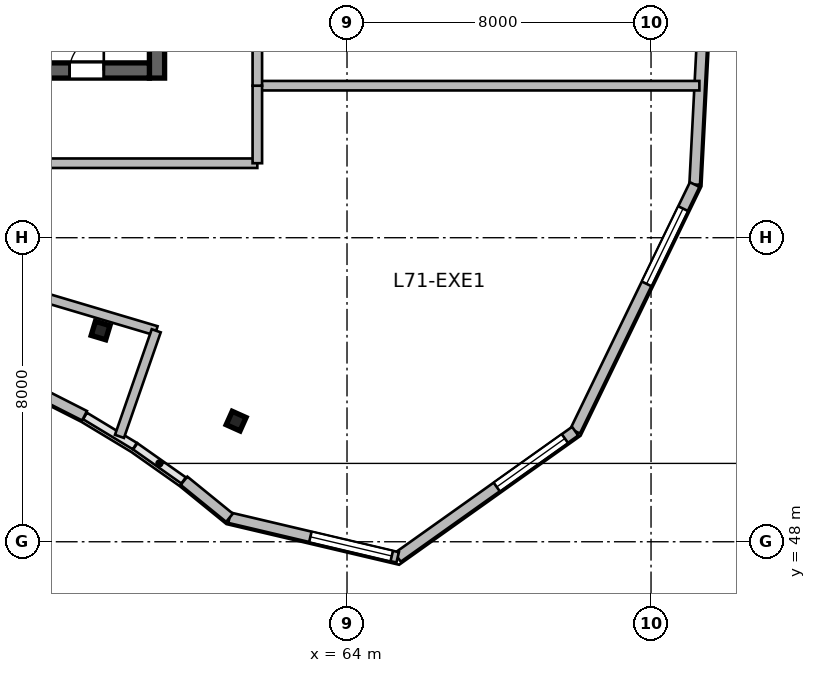
"""IFC4 building model, lengths in metres.
Left out: names, types, materials, properties, quantities, classifications, styles, units other than length and angle.
Written with IfcOpenShell. Run it as: python <this file> out.ifc"""

import sys

from ifc_helpers import new_model, si_unit, direction, frame, frame_2d, origin, origin_2d, place, context, subcontext, project, spatial, rectangle, i_section, extrude, source, transform, mapped, element, fill, save


model = new_model("IFC4")
c1 = context("Model", 3, precision=1e-05, world=origin(), true_north=direction((0.0, 1.0)))
c2 = subcontext(c1, "Body", "Model", "MODEL_VIEW")
j1 = project(units=[si_unit("LENGTHUNIT", "METRE"), si_unit("PLANEANGLEUNIT", "RADIAN")], contexts=[c1])
p1 = place(None, origin())
s1 = spatial("IfcSite", under=j1, at=p1, CompositionType="ELEMENT")
p2 = place(p1, origin())
s2 = spatial("IfcBuilding", under=s1, at=p2, CompositionType="ELEMENT")
p3 = place(p2, frame((0.0, 0.0, 291.3)))
s3 = spatial("IfcBuildingStorey", under=s2, at=p3, CompositionType="ELEMENT", Elevation=291.3)
m1 = source(origin(), c2, "Body", "SweptSolid", [
    extrude(rectangle(XDim=12.0, YDim=0.4, at=frame_2d((6.0, 0.0))), origin(), (0.0, 0.0, 1.0), 3.9),
])
p4 = place(p3, frame((59.0, 60.2, 0.0), z_axis=(0.0, 0.0, 1.0), x_axis=(0.0, 1.0, 0.0)))
e1 = element("IfcWall", 1, at=p4, inside=s3, PredefinedType="SHEAR", context=c2, shape_type="MappedRepresentation", body=[
    mapped(m1, transform((0.0, 0.0, 0.0), scale=1.0)),
])
m2 = source(origin(), c2, "Body", "SweptSolid", [
    extrude(rectangle(XDim=21.6, YDim=0.4, at=frame_2d((10.8, 0.0))), origin(), (0.0, 0.0, 1.0), 3.9),
])
p5 = place(p3, frame((37.2, 60.4, 0.0), z_axis=(0.0, 0.0, 1.0), x_axis=(1.0, 0.0, 0.0)))
e2 = element("IfcWall", 2, at=p5, inside=s3, PredefinedType="SHEAR", context=c2, shape_type="MappedRepresentation", body=[
    mapped(m2, transform((0.0, 0.0, 0.0), scale=1.0)),
])
p6 = place(p5, frame((1.1, 0.0, 0.0)))
e3 = element("IfcOpeningElement", 3, at=p6, cuts=e2, PredefinedType="OPENING", context=c2, shape_type="SweptSolid", body=[
    extrude(rectangle(XDim=1.15, YDim=2.15, at=frame_2d((0.575, 1.075))), frame((0.0, 0.21, 0.0), z_axis=(0.0, -1.0, 0.0), x_axis=(1.0, 0.0, 0.0)), (0.0, 0.0, 1.0), 0.42),
])
p7 = place(p5, frame((19.5, 0.0, 0.0)))
e4 = element("IfcOpeningElement", 4, at=p7, cuts=e2, PredefinedType="OPENING", context=c2, shape_type="SweptSolid", body=[
    extrude(rectangle(XDim=0.9, YDim=2.1, at=frame_2d((0.45, 1.05))), frame((0.0, 0.21, 0.0), z_axis=(0.0, -1.0, 0.0), x_axis=(1.0, 0.0, 0.0)), (0.0, 0.0, 1.0), 0.42),
])
p8 = place(p5, frame((12.02, 0.0, 0.0)))
e5 = element("IfcOpeningElement", 5, at=p8, cuts=e2, PredefinedType="OPENING", context=c2, shape_type="SweptSolid", body=[
    extrude(rectangle(XDim=1.6, YDim=2.15, at=frame_2d((0.8, 1.075))), frame((0.0, 0.21, 0.0), z_axis=(0.0, -1.0, 0.0), x_axis=(1.0, 0.0, 0.0)), (0.0, 0.0, 1.0), 0.42),
])
m3 = source(origin(), c2, "Body", "SweptSolid", [
    extrude(i_section(OverallWidth=0.399, OverallDepth=0.387, WebThickness=0.021, FlangeThickness=0.033, at=origin_2d()), origin(), (0.0, 0.0, 1.0), 3.9),
])
for number, where, z_axis, x_axis in (
    (6, (57.515, 53.558, 0.0), (0.0, 0.0, 1.0), (0.289, 0.957, 0.0)),
    (7, (61.082, 51.175, 0.0), (0.0, 0.0, 1.0), (0.409, 0.912, 0.0)),
):
    element("IfcColumn", number, at=place(p3, frame(where, z_axis=z_axis, x_axis=x_axis)), inside=s3, PredefinedType="COLUMN", context=c2, shape_type="MappedRepresentation", body=[
        mapped(m3, transform((0.0, 0.0, 0.0), scale=1.0)),
    ])
m4 = source(origin(), c2, "Body", "SweptSolid", [
    extrude(rectangle(XDim=7.151, YDim=0.28, at=frame_2d((3.576, 0.0))), origin(), (0.0, 0.0, 1.0), 3.64),
])
p9 = place(p3, frame((73.516, 64.54, 0.0), z_axis=(0.0, 0.0, 1.0), x_axis=(-0.051449614265, -0.998675591567, 0.0)))
e8 = element("IfcWall", 8, at=p9, inside=s3, PredefinedType="SOLIDWALL", context=c2, shape_type="MappedRepresentation", body=[
    mapped(m4, transform((0.0, 0.0, 0.0), scale=1.0)),
])
p10 = place(p9, frame((0.688, 0.0, 0.95)))
e9 = element("IfcOpeningElement", 9, at=p10, cuts=e8, PredefinedType="OPENING", context=c2, shape_type="SweptSolid", body=[
    extrude(rectangle(XDim=2.2, YDim=2.1, at=frame_2d((1.1, 1.05))), frame((0.0, 0.15, 0.0), z_axis=(0.0, -1.0, 0.0), x_axis=(1.0, 0.0, 0.0)), (0.0, 0.0, 1.0), 0.3),
])
m5 = source(origin(), c2, "Body", "SweptSolid", [
    extrude(rectangle(XDim=7.211, YDim=0.28, at=frame_2d((3.606, 0.0))), origin(), (0.0, 0.0, 1.0), 3.64),
])
p11 = place(p3, frame((73.148, 57.399, 0.0), z_axis=(0.0, 0.0, 1.0), x_axis=(-0.436088263006, -0.899903898685, 0.0)))
e10 = element("IfcWall", 10, at=p11, inside=s3, PredefinedType="SOLIDWALL", context=c2, shape_type="MappedRepresentation", body=[
    mapped(m5, transform((0.0, 0.0, 0.0), scale=1.0)),
])
p12 = place(p11, frame((0.703, 0.0, 0.95)))
e11 = element("IfcOpeningElement", 11, at=p12, cuts=e10, PredefinedType="OPENING", context=c2, shape_type="SweptSolid", body=[
    extrude(rectangle(XDim=2.2, YDim=2.1, at=frame_2d((1.1, 1.05))), frame((0.0, 0.15, 0.0), z_axis=(0.0, -1.0, 0.0), x_axis=(1.0, 0.0, 0.0)), (0.0, 0.0, 1.0), 0.3),
])
m6 = source(origin(), c2, "Body", "SweptSolid", [
    extrude(rectangle(XDim=5.731, YDim=0.28, at=frame_2d((2.865, 0.0))), origin(), (0.0, 0.0, 1.0), 3.64),
])
p13 = place(p3, frame((70.004, 50.909, 0.0), z_axis=(0.0, 0.0, 1.0), x_axis=(-0.815021045908, -0.579431354629, 0.0)))
e12 = element("IfcWall", 12, at=p13, inside=s3, PredefinedType="SOLIDWALL", context=c2, shape_type="MappedRepresentation", body=[
    mapped(m6, transform((0.0, 0.0, 0.0), scale=1.0)),
])
p14 = place(p13, frame((0.333, 0.0, 0.95)))
e13 = element("IfcOpeningElement", 13, at=p14, cuts=e12, PredefinedType="OPENING", context=c2, shape_type="SweptSolid", body=[
    extrude(rectangle(XDim=2.2, YDim=2.1, at=frame_2d((1.1, 1.05))), frame((0.0, 0.15, 0.0), z_axis=(0.0, -1.0, 0.0), x_axis=(1.0, 0.0, 0.0)), (0.0, 0.0, 1.0), 0.3),
])
m7 = source(origin(), c2, "Body", "SweptSolid", [
    extrude(rectangle(XDim=4.547, YDim=0.28, at=frame_2d((2.273, 0.0))), origin(), (0.0, 0.0, 1.0), 3.64),
])
p15 = place(p3, frame((65.333, 47.589, 0.0), z_axis=(0.0, 0.0, 1.0), x_axis=(-0.973332593516, 0.229398479505, 0.0)))
e14 = element("IfcWall", 14, at=p15, inside=s3, PredefinedType="SOLIDWALL", context=c2, shape_type="MappedRepresentation", body=[
    mapped(m7, transform((0.0, 0.0, 0.0), scale=1.0)),
])
p16 = place(p15, frame((0.16, 0.0, 0.95)))
e15 = element("IfcOpeningElement", 15, at=p16, cuts=e14, PredefinedType="OPENING", context=c2, shape_type="SweptSolid", body=[
    extrude(rectangle(XDim=2.2, YDim=2.1, at=frame_2d((1.1, 1.05))), frame((0.0, 0.15, 0.0), z_axis=(0.0, -1.0, 0.0), x_axis=(1.0, 0.0, 0.0)), (0.0, 0.0, 1.0), 0.3),
])
m8 = source(origin(), c2, "Body", "SweptSolid", [
    extrude(rectangle(XDim=1.543, YDim=0.28, at=frame_2d((0.772, 0.0))), origin(), (0.0, 0.0, 1.0), 3.64),
])
p17 = place(p3, frame((60.908, 48.632, 0.0), z_axis=(0.0, 0.0, 1.0), x_axis=(-0.77582846857, 0.63094388606, 0.0)))
e16 = element("IfcWall", 16, at=p17, inside=s3, PredefinedType="SOLIDWALL", context=c2, shape_type="MappedRepresentation", body=[
    mapped(m8, transform((0.0, 0.0, 0.0), scale=1.0)),
])
m9 = source(origin(), c2, "Body", "SweptSolid", [
    extrude(rectangle(XDim=1.509, YDim=0.28, at=frame_2d((0.754, 0.0))), origin(), (0.0, 0.0, 1.0), 3.64),
])
p18 = place(p3, frame((57.094, 51.315, 0.0), z_axis=(0.0, 0.0, 1.0), x_axis=(-0.89169189228, 0.452642871635, 0.0)))
e17 = element("IfcWall", 17, at=p18, inside=s3, PredefinedType="SOLIDWALL", context=c2, shape_type="MappedRepresentation", body=[
    mapped(m9, transform((0.0, 0.0, 0.0), scale=1.0)),
])
m10 = source(origin(), c2, "Body", "SweptSolid", [
    extrude(rectangle(XDim=11.454, YDim=0.25, at=frame_2d((5.727, 0.0))), origin(), (0.0, 0.0, 1.0), 3.314),
])
p19 = place(p3, frame((48.0, 56.813, 0.0), z_axis=(0.0, 0.0, 1.0), x_axis=(0.958594874645, -0.284773359541, 0.0)))
e18 = element("IfcWall", 18, at=p19, inside=s3, PredefinedType="PARTITIONING", context=c2, shape_type="MappedRepresentation", body=[
    mapped(m10, transform((0.0, 0.0, 0.0), scale=1.0)),
])
p20 = place(p19, frame((5.627, 0.0, 0.0)))
e19 = element("IfcOpeningElement", 19, at=p20, cuts=e18, PredefinedType="OPENING", context=c2, shape_type="SweptSolid", body=[
    extrude(rectangle(XDim=1.1, YDim=2.15, at=frame_2d((0.55, 1.075))), frame((0.0, 0.135, 0.0), z_axis=(0.0, -1.0, 0.0), x_axis=(1.0, 0.0, 0.0)), (0.0, 0.0, 1.0), 0.27),
])
m11 = source(origin(), c2, "Body", "SweptSolid", [
    extrude(rectangle(XDim=2.942, YDim=0.25, at=frame_2d((1.471, 0.0))), origin(), (0.0, 0.0, 1.0), 3.64),
])
p21 = place(p3, frame((58.013, 50.773, 0.0), z_axis=(0.0, 0.0, 1.0), x_axis=(0.328623620494, 0.944460965871, 0.0)))
e20 = element("IfcWall", 20, at=p21, inside=s3, PredefinedType="PARTITIONING", context=c2, shape_type="MappedRepresentation", body=[
    mapped(m11, transform((0.0, 0.0, 0.0), scale=1.0)),
])
m12 = source(origin(), c2, "Body", "SweptSolid", [
    extrude(rectangle(XDim=12.39, YDim=0.25, at=frame_2d((6.195, 0.0))), origin(), (0.0, 0.0, 1.0), 3.64),
])
p22 = place(p3, frame((49.25, 57.96, 0.0), z_axis=(0.0, 0.0, 1.0), x_axis=(1.0, 0.0, 0.0)))
e21 = element("IfcWall", 21, at=p22, inside=s3, PredefinedType="PARTITIONING", context=c2, shape_type="MappedRepresentation", body=[
    mapped(m12, transform((0.0, 0.0, 0.0), scale=1.0)),
])
m13 = source(origin(), c2, "Body", "SweptSolid", [
    extrude(rectangle(XDim=11.633, YDim=0.25, at=frame_2d((5.816, 0.0))), origin(), (0.0, 0.0, 1.0), 3.64),
])
p23 = place(p3, frame((61.64, 60.0, 0.0), z_axis=(0.0, 0.0, 1.0), x_axis=(1.0, 0.0, 0.0)))
e22 = element("IfcWall", 22, at=p23, inside=s3, PredefinedType="PARTITIONING", context=c2, shape_type="MappedRepresentation", body=[
    mapped(m13, transform((0.0, 0.0, 0.0), scale=1.0)),
])
m14 = source(origin(), c2, "Body", "SweptSolid", [
    extrude(rectangle(XDim=2.04, YDim=0.25, at=frame_2d((1.02, 0.0))), origin(), (0.0, 0.0, 1.0), 3.64),
])
p24 = place(p3, frame((61.64, 57.96, 0.0), z_axis=(0.0, 0.0, 1.0), x_axis=(0.0, 1.0, 0.0)))
e23 = element("IfcWall", 23, at=p24, inside=s3, PredefinedType="PARTITIONING", context=c2, shape_type="MappedRepresentation", body=[
    mapped(m14, transform((0.0, 0.0, 0.0), scale=1.0)),
])
m15 = source(origin(), c2, "Body", "SweptSolid", [
    extrude(rectangle(XDim=5.5, YDim=0.25, at=frame_2d((2.75, 0.0))), origin(), (0.0, 0.0, 1.0), 3.64),
])
p25 = place(p3, frame((61.64, 60.0, 0.0), z_axis=(0.0, 0.0, 1.0), x_axis=(0.0, 1.0, 0.0)))
e24 = element("IfcWall", 24, at=p25, inside=s3, PredefinedType="PARTITIONING", context=c2, shape_type="MappedRepresentation", body=[
    mapped(m15, transform((0.0, 0.0, 0.0), scale=1.0)),
])
p26 = place(p25, frame((1.615, 0.0, 0.0)))
e25 = element("IfcOpeningElement", 25, at=p26, cuts=e24, PredefinedType="OPENING", context=c2, shape_type="SweptSolid", body=[
    extrude(rectangle(XDim=0.95, YDim=2.1, at=frame_2d((0.475, 1.05))), frame((0.0, 0.135, 0.0), z_axis=(0.0, -1.0, 0.0), x_axis=(1.0, 0.0, 0.0)), (0.0, 0.0, 1.0), 0.27),
])
m16 = source(origin(), c2, "Body", "SweptSolid", [
    extrude(rectangle(XDim=2.2, YDim=2.1, at=frame_2d((1.1, 1.05))), frame((0.0, 0.03, 0.0), z_axis=(0.0, -1.0, 0.0), x_axis=(1.0, 0.0, 0.0)), (0.0, 0.0, 1.0), 0.06),
])
p27 = place(p12, origin())
e26 = element("IfcWindow", 26, at=p27, inside=s3, PartitioningType="TRIPLE_PANEL_VERTICAL", PredefinedType="WINDOW", context=c2, shape_type="MappedRepresentation", body=[
    mapped(m16, transform((0.0, 0.0, 0.0), scale=1.0)),
])
fill(e11, e26)
p28 = place(p14, origin())
e27 = element("IfcWindow", 27, at=p28, inside=s3, PartitioningType="TRIPLE_PANEL_VERTICAL", PredefinedType="WINDOW", context=c2, shape_type="MappedRepresentation", body=[
    mapped(m16, transform((0.0, 0.0, 0.0), scale=1.0)),
])
fill(e13, e27)
p29 = place(p16, origin())
e28 = element("IfcWindow", 28, at=p29, inside=s3, PartitioningType="TRIPLE_PANEL_VERTICAL", PredefinedType="WINDOW", context=c2, shape_type="MappedRepresentation", body=[
    mapped(m16, transform((0.0, 0.0, 0.0), scale=1.0)),
])
fill(e15, e28)
m17 = source(origin(), c2, "Body", "SweptSolid", [
    extrude(rectangle(XDim=0.9, YDim=2.1, at=frame_2d((0.45, 1.05))), frame((0.0, 0.025, 0.0), z_axis=(0.0, -1.0, 0.0), x_axis=(1.0, 0.0, 0.0)), (0.0, 0.0, 1.0), 0.05),
])
p30 = place(p7, origin())
e29 = element("IfcDoor", 29, at=p30, inside=s3, OperationType="SINGLE_SWING_RIGHT", PredefinedType="DOOR", context=c2, shape_type="MappedRepresentation", body=[
    mapped(m17, transform((0.0, 0.0, 0.0), scale=1.0)),
])
fill(e4, e29)
save(model, sys.argv[1])
